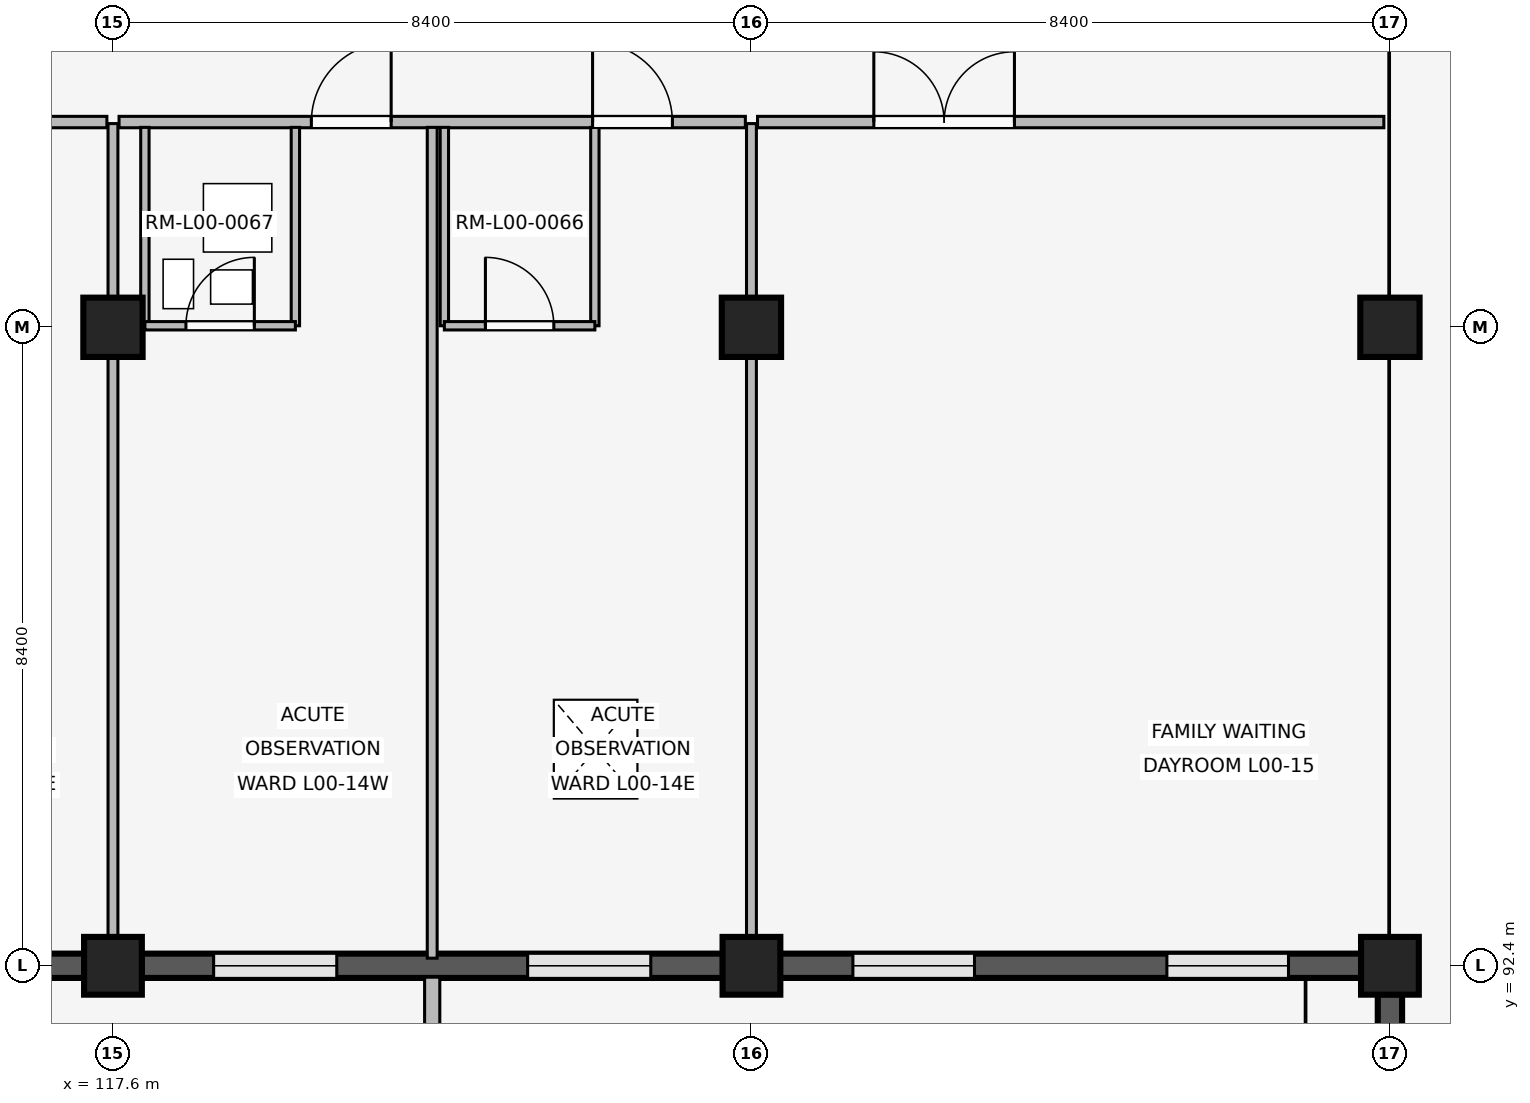
"""IFC4 building model, lengths in metres.
Left out: names, types, materials, properties, quantities, classifications, styles, units other than length and angle.
Written with IfcOpenShell. Run it as: python <this file> out.ifc"""

import sys

from ifc_helpers import new_model, si_unit, direction, frame, frame_2d, origin, origin_2d, place, context, subcontext, project, spatial, rectangle, extrude, element, fill, save


model = new_model("IFC4")
c1 = context("Model", 3, precision=1e-05, world=origin(), true_north=direction((0.0, 1.0)))
c2 = subcontext(c1, "Body", "Model", "MODEL_VIEW")
j1 = project(units=[si_unit("LENGTHUNIT", "METRE"), si_unit("PLANEANGLEUNIT", "RADIAN")], contexts=[c1])
p1 = place(None, origin())
s1 = spatial("IfcSite", under=j1, at=p1, CompositionType="ELEMENT")
p2 = place(p1, origin())
s2 = spatial("IfcBuilding", under=s1, at=p2, CompositionType="ELEMENT")
p3 = place(p2, origin())
s3 = spatial("IfcBuildingStorey", under=s2, at=p3, CompositionType="ELEMENT", Elevation=0.0)
p4 = place(p3, frame((117.6, 92.4, 0.0), z_axis=(0.0, 0.0, 1.0), x_axis=(1.0, 0.0, 0.0)))
e1 = element("IfcColumn", 1, at=p4, inside=s3, PredefinedType="COLUMN", context=c2, shape_type="SweptSolid", body=[
    extrude(rectangle(XDim=0.76, YDim=0.76, at=origin_2d()), origin(), (0.0, 0.0, 1.0), 4.8),
])
p5 = place(p3, frame((117.6, 100.8, 0.0), z_axis=(0.0, 0.0, 1.0), x_axis=(1.0, 0.0, 0.0)))
e2 = element("IfcColumn", 2, at=p5, inside=s3, PredefinedType="COLUMN", context=c2, shape_type="SweptSolid", body=[
    extrude(rectangle(XDim=0.78, YDim=0.78, at=origin_2d()), origin(), (0.0, 0.0, 1.0), 4.8),
])
p6 = place(p3, frame((126.0, 92.4, 0.0), z_axis=(0.0, 0.0, 1.0), x_axis=(1.0, 0.0, 0.0)))
e3 = element("IfcColumn", 3, at=p6, inside=s3, PredefinedType="COLUMN", context=c2, shape_type="SweptSolid", body=[
    extrude(rectangle(XDim=0.76, YDim=0.76, at=origin_2d()), origin(), (0.0, 0.0, 1.0), 4.8),
])
p7 = place(p3, frame((126.0, 100.8, 0.0), z_axis=(0.0, 0.0, 1.0), x_axis=(1.0, 0.0, 0.0)))
e4 = element("IfcColumn", 4, at=p7, inside=s3, PredefinedType="COLUMN", context=c2, shape_type="SweptSolid", body=[
    extrude(rectangle(XDim=0.78, YDim=0.78, at=origin_2d()), origin(), (0.0, 0.0, 1.0), 4.8),
])
p8 = place(p3, frame((134.4, 92.4, 0.0), z_axis=(0.0, 0.0, 1.0), x_axis=(1.0, 0.0, 0.0)))
e5 = element("IfcColumn", 5, at=p8, inside=s3, PredefinedType="COLUMN", context=c2, shape_type="SweptSolid", body=[
    extrude(rectangle(XDim=0.76, YDim=0.76, at=origin_2d()), origin(), (0.0, 0.0, 1.0), 4.8),
])
p9 = place(p3, frame((134.4, 100.8, 0.0), z_axis=(0.0, 0.0, 1.0), x_axis=(1.0, 0.0, 0.0)))
e6 = element("IfcColumn", 6, at=p9, inside=s3, PredefinedType="COLUMN", context=c2, shape_type="SweptSolid", body=[
    extrude(rectangle(XDim=0.78, YDim=0.78, at=origin_2d()), origin(), (0.0, 0.0, 1.0), 4.8),
])
p10 = place(p3, frame((117.225, 92.4, 0.0), z_axis=(0.0, 0.0, 1.0), x_axis=(-1.0, 0.0, 0.0)))
e7 = element("IfcWall", 7, at=p10, inside=s3, PredefinedType="SOLIDWALL", context=c2, shape_type="SweptSolid", body=[
    extrude(rectangle(XDim=7.65, YDim=0.32, at=frame_2d((3.825, 0.0))), origin(), (0.0, 0.0, 1.0), 3.82),
])
p11 = place(p10, frame((1.139, 0.0, 0.85)))
e8 = element("IfcOpeningElement", 8, at=p11, cuts=e7, PredefinedType="OPENING", context=c2, shape_type="SweptSolid", body=[
    extrude(rectangle(XDim=1.24, YDim=1.34, at=frame_2d((0.62, 0.67))), frame((0.0, 0.17, 0.0), z_axis=(0.0, -1.0, 0.0), x_axis=(1.0, 0.0, 0.0)), (0.0, 0.0, 1.0), 0.34),
])
p12 = place(p10, frame((5.271, 0.0, 0.85)))
e9 = element("IfcOpeningElement", 9, at=p12, cuts=e7, PredefinedType="OPENING", context=c2, shape_type="SweptSolid", body=[
    extrude(rectangle(XDim=1.24, YDim=1.34, at=frame_2d((0.62, 0.67))), frame((0.0, 0.17, 0.0), z_axis=(0.0, -1.0, 0.0), x_axis=(1.0, 0.0, 0.0)), (0.0, 0.0, 1.0), 0.34),
])
p13 = place(p3, frame((125.625, 92.4, 0.0), z_axis=(0.0, 0.0, 1.0), x_axis=(-1.0, 0.0, 0.0)))
e10 = element("IfcWall", 10, at=p13, inside=s3, PredefinedType="SOLIDWALL", context=c2, shape_type="SweptSolid", body=[
    extrude(rectangle(XDim=7.65, YDim=0.32, at=frame_2d((3.825, 0.0))), origin(), (0.0, 0.0, 1.0), 3.82),
])
p14 = place(p13, frame((0.949, 0.0, 0.85)))
e11 = element("IfcOpeningElement", 11, at=p14, cuts=e10, PredefinedType="OPENING", context=c2, shape_type="SweptSolid", body=[
    extrude(rectangle(XDim=1.62, YDim=1.52, at=frame_2d((0.81, 0.76))), frame((0.0, 0.17, 0.0), z_axis=(0.0, -1.0, 0.0), x_axis=(1.0, 0.0, 0.0)), (0.0, 0.0, 1.0), 0.34),
])
p15 = place(p13, frame((5.081, 0.0, 0.85)))
e12 = element("IfcOpeningElement", 12, at=p15, cuts=e10, PredefinedType="OPENING", context=c2, shape_type="SweptSolid", body=[
    extrude(rectangle(XDim=1.62, YDim=1.52, at=frame_2d((0.81, 0.76))), frame((0.0, 0.17, 0.0), z_axis=(0.0, -1.0, 0.0), x_axis=(1.0, 0.0, 0.0)), (0.0, 0.0, 1.0), 0.34),
])
p16 = place(p3, frame((121.8, 92.25, 0.0), z_axis=(0.0, 0.0, 1.0), x_axis=(0.0, -1.0, 0.0)))
e13 = element("IfcWall", 13, at=p16, inside=s3, PredefinedType="ELEMENTEDWALL", context=c2, shape_type="SweptSolid", body=[
    extrude(rectangle(XDim=0.85, YDim=0.2, at=frame_2d((0.425, 0.0))), origin(), (0.0, 0.0, 1.0), 3.8),
])
p17 = place(p3, frame((134.025, 92.4, 0.0), z_axis=(0.0, 0.0, 1.0), x_axis=(-1.0, 0.0, 0.0)))
e14 = element("IfcWall", 14, at=p17, inside=s3, PredefinedType="SOLIDWALL", context=c2, shape_type="SweptSolid", body=[
    extrude(rectangle(XDim=7.65, YDim=0.32, at=frame_2d((3.825, 0.0))), origin(), (0.0, 0.0, 1.0), 3.82),
])
p18 = place(p17, frame((0.959, 0.0, 0.85)))
e15 = element("IfcOpeningElement", 15, at=p18, cuts=e14, PredefinedType="OPENING", context=c2, shape_type="SweptSolid", body=[
    extrude(rectangle(XDim=1.6, YDim=1.65, at=frame_2d((0.8, 0.825))), frame((0.0, 0.17, 0.0), z_axis=(0.0, -1.0, 0.0), x_axis=(1.0, 0.0, 0.0)), (0.0, 0.0, 1.0), 0.34),
])
p19 = place(p17, frame((5.091, 0.0, 0.85)))
e16 = element("IfcOpeningElement", 16, at=p19, cuts=e14, PredefinedType="OPENING", context=c2, shape_type="SweptSolid", body=[
    extrude(rectangle(XDim=1.6, YDim=1.65, at=frame_2d((0.8, 0.825))), frame((0.0, 0.17, 0.0), z_axis=(0.0, -1.0, 0.0), x_axis=(1.0, 0.0, 0.0)), (0.0, 0.0, 1.0), 0.34),
])
p20 = place(p3, frame((134.4, 84.375, 0.0), z_axis=(0.0, 0.0, 1.0), x_axis=(0.0, 1.0, 0.0)))
e17 = element("IfcWall", 17, at=p20, inside=s3, PredefinedType="SOLIDWALL", context=c2, shape_type="SweptSolid", body=[
    extrude(rectangle(XDim=7.65, YDim=0.32, at=frame_2d((3.825, 0.0))), origin(), (0.0, 0.0, 1.0), 3.82),
])
p21 = place(p20, frame((0.959, 0.0, 0.85)))
e18 = element("IfcOpeningElement", 18, at=p21, cuts=e17, PredefinedType="OPENING", context=c2, shape_type="SweptSolid", body=[
    extrude(rectangle(XDim=1.6, YDim=1.65, at=frame_2d((0.8, 0.825))), frame((0.0, 0.17, 0.0), z_axis=(0.0, -1.0, 0.0), x_axis=(1.0, 0.0, 0.0)), (0.0, 0.0, 1.0), 0.34),
])
p22 = place(p20, frame((5.091, 0.0, 0.85)))
e19 = element("IfcOpeningElement", 19, at=p22, cuts=e17, PredefinedType="OPENING", context=c2, shape_type="SweptSolid", body=[
    extrude(rectangle(XDim=1.6, YDim=1.65, at=frame_2d((0.8, 0.825))), frame((0.0, 0.17, 0.0), z_axis=(0.0, -1.0, 0.0), x_axis=(1.0, 0.0, 0.0)), (0.0, 0.0, 1.0), 0.34),
])
p23 = place(p3, frame((109.28, 103.5, 0.0), z_axis=(0.0, 0.0, 1.0), x_axis=(1.0, 0.0, 0.0)))
e20 = element("IfcWall", 20, at=p23, inside=s3, PredefinedType="PARTITIONING", context=c2, shape_type="SweptSolid", body=[
    extrude(rectangle(XDim=8.24, YDim=0.15, at=frame_2d((4.12, 0.0))), origin(), (0.0, 0.0, 1.0), 3.8),
])
p24 = place(p23, frame((2.53, 0.0, 0.0)))
e21 = element("IfcOpeningElement", 21, at=p24, cuts=e20, PredefinedType="OPENING", context=c2, shape_type="SweptSolid", body=[
    extrude(rectangle(XDim=1.05, YDim=2.2, at=frame_2d((0.525, 1.1))), frame((0.0, 0.085, 0.0), z_axis=(0.0, -1.0, 0.0), x_axis=(1.0, 0.0, 0.0)), (0.0, 0.0, 1.0), 0.17),
])
p25 = place(p23, frame((6.23, 0.0, 0.0)))
e22 = element("IfcOpeningElement", 22, at=p25, cuts=e20, PredefinedType="OPENING", context=c2, shape_type="SweptSolid", body=[
    extrude(rectangle(XDim=1.05, YDim=2.2, at=frame_2d((0.525, 1.1))), frame((0.0, 0.085, 0.0), z_axis=(0.0, -1.0, 0.0), x_axis=(1.0, 0.0, 0.0)), (0.0, 0.0, 1.0), 0.17),
])
p26 = place(p3, frame((117.6, 92.54, 0.0), z_axis=(0.0, 0.0, 1.0), x_axis=(0.0, 1.0, 0.0)))
e23 = element("IfcWall", 23, at=p26, inside=s3, PredefinedType="PARTITIONING", context=c2, shape_type="SweptSolid", body=[
    extrude(rectangle(XDim=10.94, YDim=0.13, at=frame_2d((5.47, 0.0))), origin(), (0.0, 0.0, 1.0), 3.8),
])
p27 = place(p3, frame((117.68, 103.5, 0.0), z_axis=(0.0, 0.0, 1.0), x_axis=(1.0, 0.0, 0.0)))
e24 = element("IfcWall", 24, at=p27, inside=s3, PredefinedType="PARTITIONING", context=c2, shape_type="SweptSolid", body=[
    extrude(rectangle(XDim=8.24, YDim=0.15, at=frame_2d((4.12, 0.0))), origin(), (0.0, 0.0, 1.0), 3.8),
])
p28 = place(p27, frame((2.53, 0.0, 0.0)))
e25 = element("IfcOpeningElement", 25, at=p28, cuts=e24, PredefinedType="OPENING", context=c2, shape_type="SweptSolid", body=[
    extrude(rectangle(XDim=1.05, YDim=2.2, at=frame_2d((0.525, 1.1))), frame((0.0, 0.085, 0.0), z_axis=(0.0, -1.0, 0.0), x_axis=(1.0, 0.0, 0.0)), (0.0, 0.0, 1.0), 0.17),
])
p29 = place(p27, frame((6.23, 0.0, 0.0)))
e26 = element("IfcOpeningElement", 26, at=p29, cuts=e24, PredefinedType="OPENING", context=c2, shape_type="SweptSolid", body=[
    extrude(rectangle(XDim=1.05, YDim=2.2, at=frame_2d((0.525, 1.1))), frame((0.0, 0.085, 0.0), z_axis=(0.0, -1.0, 0.0), x_axis=(1.0, 0.0, 0.0)), (0.0, 0.0, 1.0), 0.17),
])
p30 = place(p3, frame((121.8, 92.5, 0.0), z_axis=(0.0, 0.0, 1.0), x_axis=(0.0, 1.0, 0.0)))
e27 = element("IfcWall", 27, at=p30, inside=s3, PredefinedType="PARTITIONING", context=c2, shape_type="SweptSolid", body=[
    extrude(rectangle(XDim=10.93, YDim=0.13, at=frame_2d((5.465, 0.0))), origin(), (0.0, 0.0, 1.0), 3.8),
])
for number, where, z_axis, x_axis in (
    (28, (118.02, 100.82, 0.0), (0.0, 0.0, 1.0), (0.0, 1.0, 0.0)),
    (29, (120.0, 100.82, 0.0), (0.0, 0.0, 1.0), (0.0, 1.0, 0.0)),
):
    element("IfcWall", number, at=place(p3, frame(where, z_axis=z_axis, x_axis=x_axis)), inside=s3, PredefinedType="PARTITIONING", context=c2, shape_type="SweptSolid", body=[
        extrude(rectangle(XDim=2.61, YDim=0.11, at=frame_2d((1.305, 0.0))), origin(), (0.0, 0.0, 1.0), 3.8),
    ])
p31 = place(p3, frame((118.02, 100.82, 0.0), z_axis=(0.0, 0.0, 1.0), x_axis=(1.0, 0.0, 0.0)))
e30 = element("IfcWall", 30, at=p31, inside=s3, PredefinedType="PARTITIONING", context=c2, shape_type="SweptSolid", body=[
    extrude(rectangle(XDim=1.98, YDim=0.11, at=frame_2d((0.99, 0.0))), origin(), (0.0, 0.0, 1.0), 3.8),
])
p32 = place(p31, frame((0.54, 0.0, 0.0)))
e31 = element("IfcOpeningElement", 31, at=p32, cuts=e30, PredefinedType="OPENING", context=c2, shape_type="SweptSolid", body=[
    extrude(rectangle(XDim=0.9, YDim=2.1, at=frame_2d((0.45, 1.05))), frame((0.0, 0.065, 0.0), z_axis=(0.0, -1.0, 0.0), x_axis=(1.0, 0.0, 0.0)), (0.0, 0.0, 1.0), 0.13),
])
for number, where, z_axis, x_axis in (
    (32, (121.96, 100.82, 0.0), (0.0, 0.0, 1.0), (0.0, 1.0, 0.0)),
    (33, (123.94, 100.82, 0.0), (0.0, 0.0, 1.0), (0.0, 1.0, 0.0)),
):
    element("IfcWall", number, at=place(p3, frame(where, z_axis=z_axis, x_axis=x_axis)), inside=s3, PredefinedType="PARTITIONING", context=c2, shape_type="SweptSolid", body=[
        extrude(rectangle(XDim=2.61, YDim=0.11, at=frame_2d((1.305, 0.0))), origin(), (0.0, 0.0, 1.0), 3.8),
    ])
p33 = place(p3, frame((121.96, 100.82, 0.0), z_axis=(0.0, 0.0, 1.0), x_axis=(1.0, 0.0, 0.0)))
e34 = element("IfcWall", 34, at=p33, inside=s3, PredefinedType="PARTITIONING", context=c2, shape_type="SweptSolid", body=[
    extrude(rectangle(XDim=1.98, YDim=0.11, at=frame_2d((0.99, 0.0))), origin(), (0.0, 0.0, 1.0), 3.8),
])
p34 = place(p33, frame((0.54, 0.0, 0.0)))
e35 = element("IfcOpeningElement", 35, at=p34, cuts=e34, PredefinedType="OPENING", context=c2, shape_type="SweptSolid", body=[
    extrude(rectangle(XDim=0.9, YDim=2.1, at=frame_2d((0.45, 1.05))), frame((0.0, 0.065, 0.0), z_axis=(0.0, -1.0, 0.0), x_axis=(1.0, 0.0, 0.0)), (0.0, 0.0, 1.0), 0.13),
])
p35 = place(p3, frame((126.0, 92.54, 0.0), z_axis=(0.0, 0.0, 1.0), x_axis=(0.0, 1.0, 0.0)))
e36 = element("IfcWall", 36, at=p35, inside=s3, PredefinedType="PARTITIONING", context=c2, shape_type="SweptSolid", body=[
    extrude(rectangle(XDim=10.94, YDim=0.13, at=frame_2d((5.47, 0.0))), origin(), (0.0, 0.0, 1.0), 3.8),
])
p36 = place(p3, frame((126.08, 103.5, 0.0), z_axis=(0.0, 0.0, 1.0), x_axis=(1.0, 0.0, 0.0)))
e37 = element("IfcWall", 37, at=p36, inside=s3, PredefinedType="PARTITIONING", context=c2, shape_type="SweptSolid", body=[
    extrude(rectangle(XDim=8.24, YDim=0.15, at=frame_2d((4.12, 0.0))), origin(), (0.0, 0.0, 1.0), 3.8),
])
p37 = place(p36, frame((1.53, 0.0, 0.0)))
e38 = element("IfcOpeningElement", 38, at=p37, cuts=e37, PredefinedType="OPENING", context=c2, shape_type="SweptSolid", body=[
    extrude(rectangle(XDim=1.85, YDim=2.3, at=frame_2d((0.925, 1.15))), frame((0.0, 0.085, 0.0), z_axis=(0.0, -1.0, 0.0), x_axis=(1.0, 0.0, 0.0)), (0.0, 0.0, 1.0), 0.17),
])
p38 = place(p14, origin())
e39 = element("IfcWindow", 39, at=p38, inside=s3, PartitioningType="SINGLE_PANEL", PredefinedType="WINDOW", context=c2, shape_type="SweptSolid", body=[
    extrude(rectangle(XDim=1.62, YDim=1.52, at=frame_2d((0.81, 0.76))), frame((0.0, 0.03, 0.0), z_axis=(0.0, -1.0, 0.0), x_axis=(1.0, 0.0, 0.0)), (0.0, 0.0, 1.0), 0.06),
])
fill(e11, e39)
p39 = place(p15, origin())
e40 = element("IfcWindow", 40, at=p39, inside=s3, PartitioningType="SINGLE_PANEL", PredefinedType="WINDOW", context=c2, shape_type="SweptSolid", body=[
    extrude(rectangle(XDim=1.62, YDim=1.52, at=frame_2d((0.81, 0.76))), frame((0.0, 0.03, 0.0), z_axis=(0.0, -1.0, 0.0), x_axis=(1.0, 0.0, 0.0)), (0.0, 0.0, 1.0), 0.06),
])
fill(e12, e40)
p40 = place(p18, origin())
e41 = element("IfcWindow", 41, at=p40, inside=s3, PartitioningType="SINGLE_PANEL", PredefinedType="WINDOW", context=c2, shape_type="SweptSolid", body=[
    extrude(rectangle(XDim=1.6, YDim=1.65, at=frame_2d((0.8, 0.825))), frame((0.0, 0.03, 0.0), z_axis=(0.0, -1.0, 0.0), x_axis=(1.0, 0.0, 0.0)), (0.0, 0.0, 1.0), 0.06),
])
fill(e15, e41)
p41 = place(p19, origin())
e42 = element("IfcWindow", 42, at=p41, inside=s3, PartitioningType="SINGLE_PANEL", PredefinedType="WINDOW", context=c2, shape_type="SweptSolid", body=[
    extrude(rectangle(XDim=1.6, YDim=1.65, at=frame_2d((0.8, 0.825))), frame((0.0, 0.03, 0.0), z_axis=(0.0, -1.0, 0.0), x_axis=(1.0, 0.0, 0.0)), (0.0, 0.0, 1.0), 0.06),
])
fill(e16, e42)
p42 = place(p28, origin())
e43 = element("IfcDoor", 43, at=p42, inside=s3, OperationType="SINGLE_SWING_RIGHT", PredefinedType="DOOR", context=c2, shape_type="SweptSolid", body=[
    extrude(rectangle(XDim=1.05, YDim=2.2, at=frame_2d((0.525, 1.1))), frame((0.0, 0.025, 0.0), z_axis=(0.0, -1.0, 0.0), x_axis=(1.0, 0.0, 0.0)), (0.0, 0.0, 1.0), 0.05),
])
fill(e25, e43)
p43 = place(p29, origin())
e44 = element("IfcDoor", 44, at=p43, inside=s3, OperationType="SINGLE_SWING_LEFT", PredefinedType="DOOR", context=c2, shape_type="SweptSolid", body=[
    extrude(rectangle(XDim=1.05, YDim=2.2, at=frame_2d((0.525, 1.1))), frame((0.0, 0.025, 0.0), z_axis=(0.0, -1.0, 0.0), x_axis=(1.0, 0.0, 0.0)), (0.0, 0.0, 1.0), 0.05),
])
fill(e26, e44)
p44 = place(p32, origin())
e45 = element("IfcDoor", 45, at=p44, inside=s3, OperationType="SINGLE_SWING_RIGHT", PredefinedType="DOOR", context=c2, shape_type="SweptSolid", body=[
    extrude(rectangle(XDim=0.9, YDim=2.1, at=frame_2d((0.45, 1.05))), frame((0.0, 0.025, 0.0), z_axis=(0.0, -1.0, 0.0), x_axis=(1.0, 0.0, 0.0)), (0.0, 0.0, 1.0), 0.05),
])
fill(e31, e45)
p45 = place(p34, origin())
e46 = element("IfcDoor", 46, at=p45, inside=s3, OperationType="SINGLE_SWING_LEFT", PredefinedType="DOOR", context=c2, shape_type="SweptSolid", body=[
    extrude(rectangle(XDim=0.9, YDim=2.1, at=frame_2d((0.45, 1.05))), frame((0.0, 0.025, 0.0), z_axis=(0.0, -1.0, 0.0), x_axis=(1.0, 0.0, 0.0)), (0.0, 0.0, 1.0), 0.05),
])
fill(e35, e46)
p46 = place(p37, origin())
e47 = element("IfcDoor", 47, at=p46, inside=s3, OperationType="DOUBLE_SWING_LEFT", PredefinedType="DOOR", context=c2, shape_type="SweptSolid", body=[
    extrude(rectangle(XDim=1.85, YDim=2.3, at=frame_2d((0.925, 1.15))), frame((0.0, 0.025, 0.0), z_axis=(0.0, -1.0, 0.0), x_axis=(1.0, 0.0, 0.0)), (0.0, 0.0, 1.0), 0.05),
])
fill(e38, e47)
save(model, sys.argv[1])
